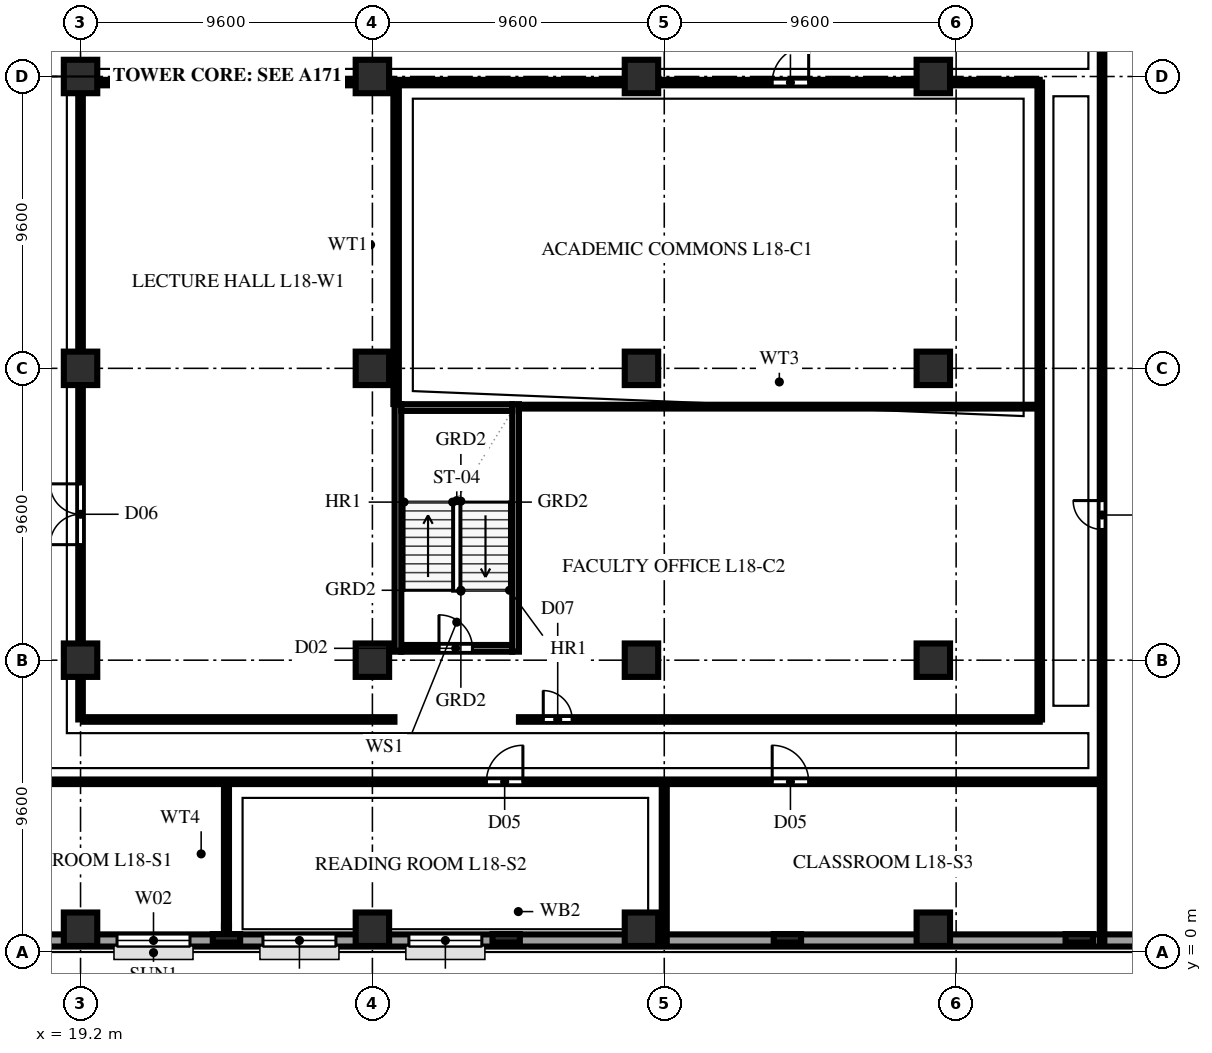
"""IFC4 building model, lengths in metres.
Left out: names, types, materials, properties, quantities, classifications, styles, units other than length and angle.
Written with IfcOpenShell. Run it as: python <this file> out.ifc"""

import sys

from ifc_helpers import new_model, si_unit, direction, frame, frame_2d, origin, origin_2d, place, context, subcontext, project, spatial, rectangle, extrude, element, fill, save


model = new_model("IFC4")
c1 = context("Model", 3, precision=1e-05, world=origin(), true_north=direction((0.0, 1.0)))
c2 = subcontext(c1, "Body", "Model", "MODEL_VIEW")
j1 = project(units=[si_unit("LENGTHUNIT", "METRE"), si_unit("PLANEANGLEUNIT", "RADIAN")], contexts=[c1])
p1 = place(None, origin())
s1 = spatial("IfcSite", under=j1, at=p1, CompositionType="ELEMENT")
p2 = place(p1, origin())
s2 = spatial("IfcBuilding", under=s1, at=p2, CompositionType="ELEMENT")
p3 = place(p2, frame((0.0, 0.0, 73.6)))
s3 = spatial("IfcBuildingStorey", under=s2, at=p3, CompositionType="ELEMENT", Elevation=73.6)
for number, where, z_axis, x_axis in (
    (1, (19.2, 0.75, 0.0), (0.0, 0.0, 1.0), (1.0, 0.0, 0.0)),
    (2, (19.2, 9.6, 0.0), (0.0, 0.0, 1.0), (1.0, 0.0, 0.0)),
    (3, (19.2, 19.2, 0.0), (0.0, 0.0, 1.0), (1.0, 0.0, 0.0)),
    (4, (19.2, 28.8, 0.0), (0.0, 0.0, 1.0), (1.0, 0.0, 0.0)),
    (5, (28.8, 0.75, 0.0), (0.0, 0.0, 1.0), (1.0, 0.0, 0.0)),
    (6, (28.8, 9.6, 0.0), (0.0, 0.0, 1.0), (1.0, 0.0, 0.0)),
    (7, (28.8, 19.2, 0.0), (0.0, 0.0, 1.0), (1.0, 0.0, 0.0)),
    (8, (28.8, 28.8, 0.0), (0.0, 0.0, 1.0), (1.0, 0.0, 0.0)),
    (9, (37.65, 0.75, 0.0), (0.0, 0.0, 1.0), (1.0, 0.0, 0.0)),
    (10, (37.65, 9.6, 0.0), (0.0, 0.0, 1.0), (1.0, 0.0, 0.0)),
    (11, (37.65, 19.2, 0.0), (0.0, 0.0, 1.0), (1.0, 0.0, 0.0)),
    (12, (37.65, 28.8, 0.0), (0.0, 0.0, 1.0), (1.0, 0.0, 0.0)),
    (13, (47.25, 0.75, 0.0), (0.0, 0.0, 1.0), (1.0, 0.0, 0.0)),
    (14, (47.25, 9.6, 0.0), (0.0, 0.0, 1.0), (1.0, 0.0, 0.0)),
    (15, (47.25, 19.2, 0.0), (0.0, 0.0, 1.0), (1.0, 0.0, 0.0)),
    (16, (47.25, 28.8, 0.0), (0.0, 0.0, 1.0), (1.0, 0.0, 0.0)),
):
    element("IfcColumn", number, at=place(p3, frame(where, z_axis=z_axis, x_axis=x_axis)), inside=s3, PredefinedType="COLUMN", context=c2, shape_type="SweptSolid", body=[
        extrude(rectangle(XDim=1.1, YDim=1.1, at=origin_2d()), origin(), (0.0, 0.0, 1.0), 3.8),
    ])
for number, where, z_axis, x_axis in (
    (17, (24.0, 0.45, 0.0), (0.0, 0.0, 1.0), (1.0, 0.0, 0.0)),
    (18, (33.2, 0.45, 0.0), (0.0, 0.0, 1.0), (1.0, 0.0, 0.0)),
    (19, (42.45, 0.45, 0.0), (0.0, 0.0, 1.0), (1.0, 0.0, 0.0)),
    (20, (52.05, 0.45, 0.0), (0.0, 0.0, 1.0), (1.0, 0.0, 0.0)),
):
    element("IfcColumn", number, at=place(p3, frame(where, z_axis=z_axis, x_axis=x_axis)), inside=s3, PredefinedType="PILASTER", context=c2, shape_type="SweptSolid", body=[
        extrude(rectangle(XDim=0.9, YDim=0.28, at=origin_2d()), origin(), (0.0, 0.0, 1.0), 3.8),
    ])
p4 = place(p3, frame((1.84, 0.38, 0.0), z_axis=(0.0, 0.0, 1.0), x_axis=(1.0, 0.0, 0.0)))
e21 = element("IfcWall", 21, at=p4, inside=s3, PredefinedType="SOLIDWALL", context=c2, shape_type="SweptSolid", body=[
    extrude(rectangle(XDim=63.52, YDim=0.4, at=frame_2d((31.76, 0.0))), origin(), (0.0, 0.0, 1.0), 3.54),
])
p5 = place(p4, frame((4.16, 0.0, 0.85)))
e22 = element("IfcOpeningElement", 22, at=p5, cuts=e21, PredefinedType="OPENING", context=c2, shape_type="SweptSolid", body=[
    extrude(rectangle(XDim=2.4, YDim=1.85, at=frame_2d((1.2, 0.925))), frame((0.0, 0.212, 0.0), z_axis=(0.0, -1.0, 0.0), x_axis=(1.0, 0.0, 0.0)), (0.0, 0.0, 1.0), 0.424),
])
p6 = place(p4, frame((8.96, 0.0, 0.85)))
e23 = element("IfcOpeningElement", 23, at=p6, cuts=e21, PredefinedType="OPENING", context=c2, shape_type="SweptSolid", body=[
    extrude(rectangle(XDim=2.4, YDim=1.85, at=frame_2d((1.2, 0.925))), frame((0.0, 0.212, 0.0), z_axis=(0.0, -1.0, 0.0), x_axis=(1.0, 0.0, 0.0)), (0.0, 0.0, 1.0), 0.424),
])
p7 = place(p4, frame((13.76, 0.0, 0.85)))
e24 = element("IfcOpeningElement", 24, at=p7, cuts=e21, PredefinedType="OPENING", context=c2, shape_type="SweptSolid", body=[
    extrude(rectangle(XDim=2.4, YDim=1.85, at=frame_2d((1.2, 0.925))), frame((0.0, 0.212, 0.0), z_axis=(0.0, -1.0, 0.0), x_axis=(1.0, 0.0, 0.0)), (0.0, 0.0, 1.0), 0.424),
])
p8 = place(p4, frame((18.56, 0.0, 0.85)))
e25 = element("IfcOpeningElement", 25, at=p8, cuts=e21, PredefinedType="OPENING", context=c2, shape_type="SweptSolid", body=[
    extrude(rectangle(XDim=2.4, YDim=1.85, at=frame_2d((1.2, 0.925))), frame((0.0, 0.212, 0.0), z_axis=(0.0, -1.0, 0.0), x_axis=(1.0, 0.0, 0.0)), (0.0, 0.0, 1.0), 0.424),
])
p9 = place(p4, frame((23.36, 0.0, 0.85)))
e26 = element("IfcOpeningElement", 26, at=p9, cuts=e21, PredefinedType="OPENING", context=c2, shape_type="SweptSolid", body=[
    extrude(rectangle(XDim=2.4, YDim=1.85, at=frame_2d((1.2, 0.925))), frame((0.0, 0.212, 0.0), z_axis=(0.0, -1.0, 0.0), x_axis=(1.0, 0.0, 0.0)), (0.0, 0.0, 1.0), 0.424),
])
p10 = place(p4, frame((28.16, 0.0, 0.85)))
e27 = element("IfcOpeningElement", 27, at=p10, cuts=e21, PredefinedType="OPENING", context=c2, shape_type="SweptSolid", body=[
    extrude(rectangle(XDim=2.4, YDim=1.85, at=frame_2d((1.2, 0.925))), frame((0.0, 0.212, 0.0), z_axis=(0.0, -1.0, 0.0), x_axis=(1.0, 0.0, 0.0)), (0.0, 0.0, 1.0), 0.424),
])
p11 = place(p3, frame((29.75, 9.99, 0.0), z_axis=(0.0, 0.0, 1.0), x_axis=(1.0, 0.0, 0.0)))
e28 = element("IfcWall", 28, at=p11, inside=s3, PredefinedType="SOLIDWALL", context=c2, shape_type="SweptSolid", body=[
    extrude(rectangle(XDim=3.65, YDim=0.22, at=frame_2d((1.825, 0.0))), origin(), (0.0, 0.0, 1.0), 3.54),
])
p12 = place(p11, frame((1.24, 0.0, 0.0)))
e29 = element("IfcOpeningElement", 29, at=p12, cuts=e28, PredefinedType="OPENING", context=c2, shape_type="SweptSolid", body=[
    extrude(rectangle(XDim=1.1, YDim=2.2, at=frame_2d((0.55, 1.1))), frame((0.0, 0.122, 0.0), z_axis=(0.0, -1.0, 0.0), x_axis=(1.0, 0.0, 0.0)), (0.0, 0.0, 1.0), 0.244),
])
for number, where, z_axis, x_axis in (
    (30, (29.64, 9.88, 0.0), (0.0, 0.0, 1.0), (0.0, 1.0, 0.0)),
    (31, (33.51, 9.88, 0.0), (0.0, 0.0, 1.0), (0.0, 1.0, 0.0)),
):
    element("IfcWall", number, at=place(p3, frame(where, z_axis=z_axis, x_axis=x_axis)), inside=s3, PredefinedType="SOLIDWALL", context=c2, shape_type="SweptSolid", body=[
        extrude(rectangle(XDim=8.14, YDim=0.22, at=frame_2d((4.07, 0.0))), origin(), (0.0, 0.0, 1.0), 3.54),
    ])
p13 = place(p3, frame((29.75, 17.91, 0.0), z_axis=(0.0, 0.0, 1.0), x_axis=(1.0, 0.0, 0.0)))
e32 = element("IfcWall", 32, at=p13, inside=s3, PredefinedType="SOLIDWALL", context=c2, shape_type="SweptSolid", body=[
    extrude(rectangle(XDim=3.65, YDim=0.22, at=frame_2d((1.825, 0.0))), origin(), (0.0, 0.0, 1.0), 3.54),
])
p14 = place(p3, frame((24.0, 0.22, 0.0), z_axis=(0.0, 0.0, 1.0), x_axis=(0.0, 1.0, 0.0)))
e33 = element("IfcWall", 33, at=p14, inside=s3, PredefinedType="PLUMBINGWALL", context=c2, shape_type="SweptSolid", body=[
    extrude(rectangle(XDim=0.636, YDim=0.165, at=frame_2d((0.318, 0.0))), origin(), (0.0, 0.0, 1.0), 3.54),
])
p15 = place(p3, frame((24.0, 0.856, 0.0), z_axis=(0.0, 0.0, 1.0), x_axis=(0.0, 1.0, 0.0)))
e34 = element("IfcWall", 34, at=p15, inside=s3, PredefinedType="PLUMBINGWALL", context=c2, shape_type="SweptSolid", body=[
    extrude(rectangle(XDim=4.744, YDim=0.165, at=frame_2d((2.372, 0.0))), origin(), (0.0, 0.0, 1.0), 3.007),
])
p16 = place(p3, frame((38.4, 0.22, 0.0), z_axis=(0.0, 0.0, 1.0), x_axis=(0.0, 1.0, 0.0)))
e35 = element("IfcWall", 35, at=p16, inside=s3, PredefinedType="PLUMBINGWALL", context=c2, shape_type="SweptSolid", body=[
    extrude(rectangle(XDim=5.38, YDim=0.165, at=frame_2d((2.69, 0.0))), origin(), (0.0, 0.0, 1.0), 3.54),
])
p17 = place(p3, frame((0.22, 5.6, 0.0), z_axis=(0.0, 0.0, 1.0), x_axis=(1.0, 0.0, 0.0)))
e36 = element("IfcWall", 36, at=p17, inside=s3, PredefinedType="PARTITIONING", context=c2, shape_type="SweptSolid", body=[
    extrude(rectangle(XDim=52.58, YDim=0.15, at=frame_2d((26.29, 0.0))), origin(), (0.0, 0.0, 1.0), 3.54),
])
p18 = place(p17, frame((13.68, 0.0, 0.0)))
e37 = element("IfcOpeningElement", 37, at=p18, cuts=e36, PredefinedType="OPENING", context=c2, shape_type="SweptSolid", body=[
    extrude(rectangle(XDim=1.2, YDim=2.2, at=frame_2d((0.6, 1.1))), frame((0.0, 0.087, 0.0), z_axis=(0.0, -1.0, 0.0), x_axis=(1.0, 0.0, 0.0)), (0.0, 0.0, 1.0), 0.174),
])
p19 = place(p17, frame((32.33, 0.0, 0.0)))
e38 = element("IfcOpeningElement", 38, at=p19, cuts=e36, PredefinedType="OPENING", context=c2, shape_type="SweptSolid", body=[
    extrude(rectangle(XDim=1.2, YDim=2.2, at=frame_2d((0.6, 1.1))), frame((0.0, 0.087, 0.0), z_axis=(0.0, -1.0, 0.0), x_axis=(1.0, 0.0, 0.0)), (0.0, 0.0, 1.0), 0.174),
])
p20 = place(p17, frame((41.73, 0.0, 0.0)))
e39 = element("IfcOpeningElement", 39, at=p20, cuts=e36, PredefinedType="OPENING", context=c2, shape_type="SweptSolid", body=[
    extrude(rectangle(XDim=1.2, YDim=2.2, at=frame_2d((0.6, 1.1))), frame((0.0, 0.087, 0.0), z_axis=(0.0, -1.0, 0.0), x_axis=(1.0, 0.0, 0.0)), (0.0, 0.0, 1.0), 0.174),
])
p21 = place(p3, frame((52.8, 0.22, 0.0), z_axis=(0.0, 0.0, 1.0), x_axis=(0.0, 1.0, 0.0)))
e40 = element("IfcWall", 40, at=p21, inside=s3, PredefinedType="PARTITIONING", context=c2, shape_type="SweptSolid", body=[
    extrude(rectangle(XDim=37.96, YDim=0.15, at=frame_2d((18.98, 0.0))), origin(), (0.0, 0.0, 1.0), 3.54),
])
p22 = place(p21, frame((13.68, 0.0, 0.0)))
e41 = element("IfcOpeningElement", 41, at=p22, cuts=e40, PredefinedType="OPENING", context=c2, shape_type="SweptSolid", body=[
    extrude(rectangle(XDim=0.95, YDim=2.15, at=frame_2d((0.475, 1.075))), frame((0.0, 0.087, 0.0), z_axis=(0.0, -1.0, 0.0), x_axis=(1.0, 0.0, 0.0)), (0.0, 0.0, 1.0), 0.174),
])
p23 = place(p3, frame((19.2, 7.65, 0.0), z_axis=(0.0, 0.0, 1.0), x_axis=(0.0, 1.0, 0.0)))
e42 = element("IfcWall", 42, at=p23, inside=s3, PredefinedType="PARTITIONING", context=c2, shape_type="SweptSolid", body=[
    extrude(rectangle(XDim=20.95, YDim=0.15, at=frame_2d((10.475, 0.0))), origin(), (0.0, 0.0, 1.0), 2.996),
])
p24 = place(p23, frame((5.75, 0.0, 0.0)))
e43 = element("IfcOpeningElement", 43, at=p24, cuts=e42, PredefinedType="OPENING", context=c2, shape_type="SweptSolid", body=[
    extrude(rectangle(XDim=2.0, YDim=2.3, at=frame_2d((1.0, 1.15))), frame((0.0, 0.087, 0.0), z_axis=(0.0, -1.0, 0.0), x_axis=(1.0, 0.0, 0.0)), (0.0, 0.0, 1.0), 0.174),
])
p25 = place(p3, frame((29.58, 18.025, 0.0), z_axis=(0.0, 0.0, 1.0), x_axis=(0.0, 1.0, 0.0)))
e44 = element("IfcWall", 44, at=p25, inside=s3, PredefinedType="PARTITIONING", context=c2, shape_type="SweptSolid", body=[
    extrude(rectangle(XDim=10.48, YDim=0.18, at=frame_2d((5.24, 0.0))), origin(), (0.0, 0.0, 1.0), 3.54),
])
p26 = place(p3, frame((19.28, 28.6, 0.0), z_axis=(0.0, 0.0, 1.0), x_axis=(1.0, 0.0, 0.0)))
e45 = element("IfcWall", 45, at=p26, inside=s3, PredefinedType="PARTITIONING", context=c2, shape_type="SweptSolid", body=[
    extrude(rectangle(XDim=31.47, YDim=0.18, at=frame_2d((15.735, 0.0))), origin(), (0.0, 0.0, 1.0), 3.54),
])
p27 = place(p26, frame((22.67, 0.0, 0.0)))
e46 = element("IfcOpeningElement", 46, at=p27, cuts=e45, PredefinedType="OPENING", context=c2, shape_type="SweptSolid", body=[
    extrude(rectangle(XDim=1.2, YDim=2.2, at=frame_2d((0.6, 1.1))), frame((0.0, 0.102, 0.0), z_axis=(0.0, -1.0, 0.0), x_axis=(1.0, 0.0, 0.0)), (0.0, 0.0, 1.0), 0.204),
])
p28 = place(p3, frame((19.28, 7.65, 0.0), z_axis=(0.0, 0.0, 1.0), x_axis=(1.0, 0.0, 0.0)))
e47 = element("IfcWall", 47, at=p28, inside=s3, PredefinedType="PARTITIONING", context=c2, shape_type="SweptSolid", body=[
    extrude(rectangle(XDim=10.245, YDim=0.15, at=frame_2d((5.123, 0.0))), origin(), (0.0, 0.0, 1.0), 3.54),
])
p29 = place(p3, frame((33.62, 17.94, 0.0), z_axis=(0.0, 0.0, 1.0), x_axis=(1.0, 0.0, 0.0)))
e48 = element("IfcWall", 48, at=p29, inside=s3, PredefinedType="PARTITIONING", context=c2, shape_type="SweptSolid", body=[
    extrude(rectangle(XDim=17.13, YDim=0.125, at=frame_2d((8.565, 0.0))), origin(), (0.0, 0.0, 1.0), 3.54),
])
p30 = place(p3, frame((33.62, 7.65, 0.0), z_axis=(0.0, 0.0, 1.0), x_axis=(1.0, 0.0, 0.0)))
e49 = element("IfcWall", 49, at=p30, inside=s3, PredefinedType="PARTITIONING", context=c2, shape_type="SweptSolid", body=[
    extrude(rectangle(XDim=17.13, YDim=0.15, at=frame_2d((8.565, 0.0))), origin(), (0.0, 0.0, 1.0), 3.54),
])
p31 = place(p30, frame((0.8, 0.0, 0.0)))
e50 = element("IfcOpeningElement", 50, at=p31, cuts=e49, PredefinedType="OPENING", context=c2, shape_type="SweptSolid", body=[
    extrude(rectangle(XDim=0.95, YDim=2.15, at=frame_2d((0.475, 1.075))), frame((0.0, 0.087, 0.0), z_axis=(0.0, -1.0, 0.0), x_axis=(1.0, 0.0, 0.0)), (0.0, 0.0, 1.0), 0.174),
])
p32 = place(p3, frame((50.75, 7.65, 0.0), z_axis=(0.0, 0.0, 1.0), x_axis=(0.0, 1.0, 0.0)))
e51 = element("IfcWall", 51, at=p32, inside=s3, PredefinedType="PARTITIONING", context=c2, shape_type="SweptSolid", body=[
    extrude(rectangle(XDim=20.95, YDim=0.15, at=frame_2d((10.475, 0.0))), origin(), (0.0, 0.0, 1.0), 3.54),
])
p33 = place(p8, origin())
e52 = element("IfcWindow", 52, at=p33, inside=s3, PartitioningType="TRIPLE_PANEL_VERTICAL", PredefinedType="WINDOW", context=c2, shape_type="SweptSolid", body=[
    extrude(rectangle(XDim=2.4, YDim=1.85, at=frame_2d((1.2, 0.925))), frame((0.0, 0.11, 0.0), z_axis=(0.0, -1.0, 0.0), x_axis=(1.0, 0.0, 0.0)), (0.0, 0.0, 1.0), 0.06),
])
fill(e25, e52)
p34 = place(p9, origin())
e53 = element("IfcWindow", 53, at=p34, inside=s3, PartitioningType="TRIPLE_PANEL_VERTICAL", PredefinedType="WINDOW", context=c2, shape_type="SweptSolid", body=[
    extrude(rectangle(XDim=2.4, YDim=1.85, at=frame_2d((1.2, 0.925))), frame((0.0, 0.11, 0.0), z_axis=(0.0, -1.0, 0.0), x_axis=(1.0, 0.0, 0.0)), (0.0, 0.0, 1.0), 0.06),
])
fill(e26, e53)
p35 = place(p10, origin())
e54 = element("IfcWindow", 54, at=p35, inside=s3, PartitioningType="TRIPLE_PANEL_VERTICAL", PredefinedType="WINDOW", context=c2, shape_type="SweptSolid", body=[
    extrude(rectangle(XDim=2.4, YDim=1.85, at=frame_2d((1.2, 0.925))), frame((0.0, 0.11, 0.0), z_axis=(0.0, -1.0, 0.0), x_axis=(1.0, 0.0, 0.0)), (0.0, 0.0, 1.0), 0.06),
])
fill(e27, e54)
p36 = place(p12, origin())
e55 = element("IfcDoor", 55, at=p36, inside=s3, OperationType="SINGLE_SWING_LEFT", PredefinedType="DOOR", context=c2, shape_type="SweptSolid", body=[
    extrude(rectangle(XDim=1.1, YDim=2.2, at=frame_2d((0.55, 1.1))), frame((0.0, 0.025, 0.0), z_axis=(0.0, -1.0, 0.0), x_axis=(1.0, 0.0, 0.0)), (0.0, 0.0, 1.0), 0.05),
])
fill(e29, e55)
p37 = place(p19, origin())
e56 = element("IfcDoor", 56, at=p37, inside=s3, OperationType="SINGLE_SWING_RIGHT", PredefinedType="DOOR", context=c2, shape_type="SweptSolid", body=[
    extrude(rectangle(XDim=1.2, YDim=2.2, at=frame_2d((0.6, 1.1))), frame((0.0, 0.025, 0.0), z_axis=(0.0, -1.0, 0.0), x_axis=(1.0, 0.0, 0.0)), (0.0, 0.0, 1.0), 0.05),
])
fill(e38, e56)
p38 = place(p20, origin())
e57 = element("IfcDoor", 57, at=p38, inside=s3, OperationType="SINGLE_SWING_LEFT", PredefinedType="DOOR", context=c2, shape_type="SweptSolid", body=[
    extrude(rectangle(XDim=1.2, YDim=2.2, at=frame_2d((0.6, 1.1))), frame((0.0, 0.025, 0.0), z_axis=(0.0, -1.0, 0.0), x_axis=(1.0, 0.0, 0.0)), (0.0, 0.0, 1.0), 0.05),
])
fill(e39, e57)
p39 = place(p22, origin())
e58 = element("IfcDoor", 58, at=p39, inside=s3, OperationType="SINGLE_SWING_RIGHT", PredefinedType="DOOR", context=c2, shape_type="SweptSolid", body=[
    extrude(rectangle(XDim=0.95, YDim=2.15, at=frame_2d((0.475, 1.075))), frame((0.0, 0.025, 0.0), z_axis=(0.0, -1.0, 0.0), x_axis=(1.0, 0.0, 0.0)), (0.0, 0.0, 1.0), 0.05),
])
fill(e41, e58)
p40 = place(p24, origin())
e59 = element("IfcDoor", 59, at=p40, inside=s3, OperationType="DOUBLE_SWING_LEFT", PredefinedType="DOOR", context=c2, shape_type="SweptSolid", body=[
    extrude(rectangle(XDim=2.0, YDim=2.3, at=frame_2d((1.0, 1.15))), frame((0.0, 0.025, 0.0), z_axis=(0.0, -1.0, 0.0), x_axis=(1.0, 0.0, 0.0)), (0.0, 0.0, 1.0), 0.05),
])
fill(e43, e59)
p41 = place(p27, origin())
e60 = element("IfcDoor", 60, at=p41, inside=s3, OperationType="SINGLE_SWING_RIGHT", PredefinedType="DOOR", context=c2, shape_type="SweptSolid", body=[
    extrude(rectangle(XDim=1.2, YDim=2.2, at=frame_2d((0.6, 1.1))), frame((0.0, 0.025, 0.0), z_axis=(0.0, -1.0, 0.0), x_axis=(1.0, 0.0, 0.0)), (0.0, 0.0, 1.0), 0.05),
])
fill(e46, e60)
p42 = place(p31, origin())
e61 = element("IfcDoor", 61, at=p42, inside=s3, OperationType="SINGLE_SWING_LEFT", PredefinedType="DOOR", context=c2, shape_type="SweptSolid", body=[
    extrude(rectangle(XDim=0.95, YDim=2.15, at=frame_2d((0.475, 1.075))), frame((0.0, 0.025, 0.0), z_axis=(0.0, -1.0, 0.0), x_axis=(1.0, 0.0, 0.0)), (0.0, 0.0, 1.0), 0.05),
])
fill(e50, e61)
save(model, sys.argv[1])
